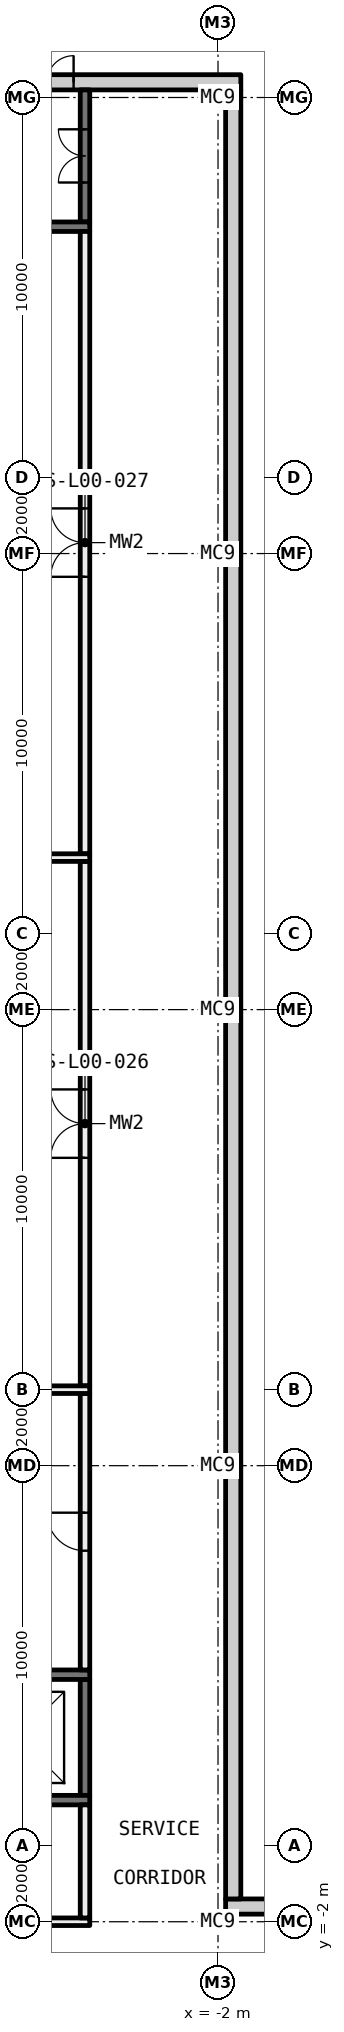
"""IFC4 building model, lengths in metres.
Left out: names, types, materials, properties, quantities, classifications, styles, units other than length and angle.
Written with IfcOpenShell. Run it as: python <this file> out.ifc"""

import sys

from ifc_helpers import new_model, si_unit, direction, frame, frame_2d, origin, origin_2d, place, context, subcontext, project, spatial, rectangle, i_section, extrude, element, fill, save


model = new_model("IFC4")
c1 = context("Model", 3, precision=1e-05, world=origin(), true_north=direction((0.0, 1.0)))
c2 = subcontext(c1, "Body", "Model", "MODEL_VIEW")
j1 = project(units=[si_unit("LENGTHUNIT", "METRE"), si_unit("PLANEANGLEUNIT", "RADIAN")], contexts=[c1])
p1 = place(None, origin())
s1 = spatial("IfcSite", under=j1, at=p1, CompositionType="ELEMENT")
p2 = place(p1, origin())
s2 = spatial("IfcBuilding", under=s1, at=p2, CompositionType="ELEMENT")
p3 = place(p2, origin())
s3 = spatial("IfcBuildingStorey", under=s2, at=p3, CompositionType="ELEMENT", Elevation=0.0)
for number, where, z_axis, x_axis in (
    (1, (-2.0, -2.0, -1.0), (0.0, 0.0, 1.0), (1.0, 0.0, 0.0)),
    (2, (-2.0, 10.0, -1.0), (0.0, 0.0, 1.0), (1.0, 0.0, 0.0)),
    (3, (-2.0, 22.0, -1.0), (0.0, 0.0, 1.0), (1.0, 0.0, 0.0)),
    (4, (-2.0, 34.0, -1.0), (0.0, 0.0, 1.0), (1.0, 0.0, 0.0)),
    (5, (-2.0, 46.0, -1.0), (0.0, 0.0, 1.0), (1.0, 0.0, 0.0)),
):
    element("IfcColumn", number, at=place(p3, frame(where, z_axis=z_axis, x_axis=x_axis)), inside=s3, PredefinedType="COLUMN", context=c2, shape_type="SweptSolid", body=[
        extrude(i_section(OverallWidth=0.4, OverallDepth=0.4, WebThickness=0.013, FlangeThickness=0.021, FilletRadius=0.022, at=origin_2d()), origin(), (0.0, 0.0, 1.0), 6.6),
    ])
p4 = place(p3, frame((-5.5, 12.1, 0.0), z_axis=(0.0, 0.0, 1.0), x_axis=(0.0, 1.0, 0.0)))
e6 = element("IfcWall", 6, at=p4, inside=s3, PredefinedType="PARTITIONING", context=c2, shape_type="SweptSolid", body=[
    extrude(rectangle(XDim=13.8, YDim=0.25, at=frame_2d((6.9, 0.0))), origin(), (0.0, 0.0, 1.0), 5.6),
])
p5 = place(p4, frame((6.0, 0.0, 0.0)))
e7 = element("IfcOpeningElement", 7, at=p5, cuts=e6, PredefinedType="OPENING", context=c2, shape_type="SweptSolid", body=[
    extrude(rectangle(XDim=1.8, YDim=2.1, at=frame_2d((0.9, 1.05))), frame((0.0, 0.135, 0.0), z_axis=(0.0, -1.0, 0.0), x_axis=(1.0, 0.0, 0.0)), (0.0, 0.0, 1.0), 0.27),
])
p6 = place(p3, frame((-5.5, 26.1, 0.0), z_axis=(0.0, 0.0, 1.0), x_axis=(0.0, 1.0, 0.0)))
e8 = element("IfcWall", 8, at=p6, inside=s3, PredefinedType="PARTITIONING", context=c2, shape_type="SweptSolid", body=[
    extrude(rectangle(XDim=16.375, YDim=0.25, at=frame_2d((8.188, 0.0))), origin(), (0.0, 0.0, 1.0), 5.6),
])
p7 = place(p6, frame((7.288, 0.0, 0.0)))
e9 = element("IfcOpeningElement", 9, at=p7, cuts=e8, PredefinedType="OPENING", context=c2, shape_type="SweptSolid", body=[
    extrude(rectangle(XDim=1.8, YDim=2.1, at=frame_2d((0.9, 1.05))), frame((0.0, 0.135, 0.0), z_axis=(0.0, -1.0, 0.0), x_axis=(1.0, 0.0, 0.0)), (0.0, 0.0, 1.0), 0.27),
])
p8 = place(p3, frame((-12.625, -2.0, 0.0), z_axis=(0.0, 0.0, 1.0), x_axis=(1.0, 0.0, 0.0)))
e10 = element("IfcWall", 10, at=p8, inside=s3, PredefinedType="PARTITIONING", context=c2, shape_type="SweptSolid", body=[
    extrude(rectangle(XDim=7.25, YDim=0.2, at=frame_2d((3.625, 0.0))), origin(), (0.0, 0.0, 1.0), 5.012),
])
p9 = place(p8, frame((2.725, 0.0, 0.0)))
e11 = element("IfcOpeningElement", 11, at=p9, cuts=e10, PredefinedType="OPENING", context=c2, shape_type="SweptSolid", body=[
    extrude(rectangle(XDim=1.8, YDim=2.1, at=frame_2d((0.9, 1.05))), frame((0.0, 0.11, 0.0), z_axis=(0.0, -1.0, 0.0), x_axis=(1.0, 0.0, 0.0)), (0.0, 0.0, 1.0), 0.22),
])
p10 = place(p3, frame((-5.5, -1.9, 0.0), z_axis=(0.0, 0.0, 1.0), x_axis=(0.0, 1.0, 0.0)))
e12 = element("IfcWall", 12, at=p10, inside=s3, PredefinedType="PARTITIONING", context=c2, shape_type="SweptSolid", body=[
    extrude(rectangle(XDim=2.975, YDim=0.25, at=frame_2d((1.487, 0.0))), origin(), (0.0, 0.0, 1.0), 5.6),
])
p11 = place(p3, frame((-5.5, 1.325, -1.8), z_axis=(0.0, 0.0, 1.0), x_axis=(0.0, 1.0, 0.0)))
e13 = element("IfcWall", 13, at=p11, inside=s3, PredefinedType="SHEAR", context=c2, shape_type="SweptSolid", body=[
    extrude(rectangle(XDim=3.05, YDim=0.25, at=frame_2d((1.525, 0.0))), origin(), (0.0, 0.0, 1.0), 7.4),
])
p12 = place(p3, frame((-5.5, 42.725, -1.0), z_axis=(0.0, 0.0, 1.0), x_axis=(0.0, 1.0, 0.0)))
e14 = element("IfcWall", 14, at=p12, inside=s3, PredefinedType="SHEAR", context=c2, shape_type="SweptSolid", body=[
    extrude(rectangle(XDim=3.475, YDim=0.25, at=frame_2d((1.737, 0.0))), origin(), (0.0, 0.0, 1.0), 6.6),
])
p13 = place(p12, frame((1.038, 0.0, 1.0)))
e15 = element("IfcOpeningElement", 15, at=p13, cuts=e14, PredefinedType="OPENING", context=c2, shape_type="SweptSolid", body=[
    extrude(rectangle(XDim=1.4, YDim=2.1, at=frame_2d((0.7, 1.05))), frame((0.0, 0.135, 0.0), z_axis=(0.0, -1.0, 0.0), x_axis=(1.0, 0.0, 0.0)), (0.0, 0.0, 1.0), 0.27),
])
p14 = place(p3, frame((-5.5, 4.625, 0.0), z_axis=(0.0, 0.0, 1.0), x_axis=(0.0, 1.0, 0.0)))
e16 = element("IfcWall", 16, at=p14, inside=s3, PredefinedType="PARTITIONING", context=c2, shape_type="SweptSolid", body=[
    extrude(rectangle(XDim=7.275, YDim=0.25, at=frame_2d((3.637, 0.0))), origin(), (0.0, 0.0, 1.0), 5.6),
])
p15 = place(p14, frame((3.138, 0.0, 0.0)))
e17 = element("IfcOpeningElement", 17, at=p15, cuts=e16, PredefinedType="OPENING", context=c2, shape_type="SweptSolid", body=[
    extrude(rectangle(XDim=1.0, YDim=2.1, at=frame_2d((0.5, 1.05))), frame((0.0, 0.135, 0.0), z_axis=(0.0, -1.0, 0.0), x_axis=(1.0, 0.0, 0.0)), (0.0, 0.0, 1.0), 0.27),
])
p16 = place(p3, frame((-26.2, 26.0, 0.0), z_axis=(0.0, 0.0, 1.0), x_axis=(1.0, 0.0, 0.0)))
e18 = element("IfcWall", 18, at=p16, inside=s3, PredefinedType="PARTITIONING", context=c2, shape_type="SweptSolid", body=[
    extrude(rectangle(XDim=20.825, YDim=0.2, at=frame_2d((10.413, 0.0))), origin(), (0.0, 0.0, 1.0), 5.6),
])
p17 = place(p3, frame((-8.875, 1.2, -1.8), z_axis=(0.0, 0.0, 1.0), x_axis=(1.0, 0.0, 0.0)))
e19 = element("IfcWall", 19, at=p17, inside=s3, PredefinedType="SHEAR", context=c2, shape_type="SweptSolid", body=[
    extrude(rectangle(XDim=3.5, YDim=0.25, at=frame_2d((1.75, 0.0))), origin(), (0.0, 0.0, 1.0), 7.4),
])
p18 = place(p17, frame((1.075, 0.0, 1.8)))
e20 = element("IfcOpeningElement", 20, at=p18, cuts=e19, PredefinedType="OPENING", context=c2, shape_type="SweptSolid", body=[
    extrude(rectangle(XDim=1.1, YDim=2.1, at=frame_2d((0.55, 1.05))), frame((0.0, 0.135, 0.0), z_axis=(0.0, -1.0, 0.0), x_axis=(1.0, 0.0, 0.0)), (0.0, 0.0, 1.0), 0.27),
])
p19 = place(p3, frame((-8.0, 4.5, -1.8), z_axis=(0.0, 0.0, 1.0), x_axis=(1.0, 0.0, 0.0)))
e21 = element("IfcWall", 21, at=p19, inside=s3, PredefinedType="SHEAR", context=c2, shape_type="SweptSolid", body=[
    extrude(rectangle(XDim=2.625, YDim=0.25, at=frame_2d((1.312, 0.0))), origin(), (0.0, 0.0, 1.0), 7.4),
])
p20 = place(p3, frame((-14.875, 42.6, -1.0), z_axis=(0.0, 0.0, 1.0), x_axis=(1.0, 0.0, 0.0)))
e22 = element("IfcWall", 22, at=p20, inside=s3, PredefinedType="SHEAR", context=c2, shape_type="SweptSolid", body=[
    extrude(rectangle(XDim=9.5, YDim=0.25, at=frame_2d((4.75, 0.0))), origin(), (0.0, 0.0, 1.0), 6.6),
])
p21 = place(p3, frame((-7.8, 12.0, 0.0), z_axis=(0.0, 0.0, 1.0), x_axis=(1.0, 0.0, 0.0)))
e23 = element("IfcWall", 23, at=p21, inside=s3, PredefinedType="PARTITIONING", context=c2, shape_type="SweptSolid", body=[
    extrude(rectangle(XDim=2.425, YDim=0.2, at=frame_2d((1.212, 0.0))), origin(), (0.0, 0.0, 1.0), 5.6),
])
p22 = place(p3, frame((-1.8, -1.6, -0.4), z_axis=(0.0, 0.0, 1.0), x_axis=(1.0, 0.0, 0.0)))
e24 = element("IfcWall", 24, at=p22, inside=s3, PredefinedType="STANDARD", context=c2, shape_type="SweptSolid", body=[
    extrude(rectangle(XDim=12.4, YDim=0.4, at=frame_2d((6.2, 0.0))), origin(), (0.0, 0.0, 1.0), 6.0),
])
p23 = place(p3, frame((-1.6, -1.4, -0.4), z_axis=(0.0, 0.0, 1.0), x_axis=(0.0, 1.0, 0.0)))
e25 = element("IfcWall", 25, at=p23, inside=s3, PredefinedType="STANDARD", context=c2, shape_type="SweptSolid", body=[
    extrude(rectangle(XDim=47.6, YDim=0.4, at=frame_2d((23.8, 0.0))), origin(), (0.0, 0.0, 1.0), 6.0),
])
p24 = place(p3, frame((-26.6, 46.4, -0.4), z_axis=(0.0, 0.0, 1.0), x_axis=(1.0, 0.0, 0.0)))
e26 = element("IfcWall", 26, at=p24, inside=s3, PredefinedType="STANDARD", context=c2, shape_type="SweptSolid", body=[
    extrude(rectangle(XDim=25.2, YDim=0.4, at=frame_2d((12.6, 0.0))), origin(), (0.0, 0.0, 1.0), 6.0),
])
p25 = place(p24, frame((19.4, 0.0, 0.4)))
e27 = element("IfcOpeningElement", 27, at=p25, cuts=e26, PredefinedType="OPENING", context=c2, shape_type="SweptSolid", body=[
    extrude(rectangle(XDim=1.4, YDim=2.1, at=frame_2d((0.7, 1.05))), frame((0.0, 0.21, 0.0), z_axis=(0.0, -1.0, 0.0), x_axis=(1.0, 0.0, 0.0)), (0.0, 0.0, 1.0), 0.42),
])
p26 = place(p24, frame((5.1, 0.0, 0.4)))
e28 = element("IfcOpeningElement", 28, at=p26, cuts=e26, PredefinedType="OPENING", context=c2, shape_type="SweptSolid", body=[
    extrude(rectangle(XDim=1.0, YDim=2.1, at=frame_2d((0.5, 1.05))), frame((0.0, 0.21, 0.0), z_axis=(0.0, -1.0, 0.0), x_axis=(1.0, 0.0, 0.0)), (0.0, 0.0, 1.0), 0.42),
])
p27 = place(p25, origin())
e29 = element("IfcDoor", 29, at=p27, inside=s3, OperationType="DOUBLE_DOOR_SINGLE_SWING", PredefinedType="DOOR", context=c2, shape_type="SweptSolid", body=[
    extrude(rectangle(XDim=1.4, YDim=2.1, at=frame_2d((0.7, 1.05))), frame((0.0, 0.025, 0.0), z_axis=(0.0, -1.0, 0.0), x_axis=(1.0, 0.0, 0.0)), (0.0, 0.0, 1.0), 0.05),
])
fill(e27, e29)
p28 = place(p13, origin())
e30 = element("IfcDoor", 30, at=p28, inside=s3, OperationType="DOUBLE_DOOR_SINGLE_SWING", PredefinedType="DOOR", context=c2, shape_type="SweptSolid", body=[
    extrude(rectangle(XDim=1.4, YDim=2.1, at=frame_2d((0.7, 1.05))), frame((0.0, 0.025, 0.0), z_axis=(0.0, -1.0, 0.0), x_axis=(1.0, 0.0, 0.0)), (0.0, 0.0, 1.0), 0.05),
])
fill(e15, e30)
p29 = place(p15, origin())
e31 = element("IfcDoor", 31, at=p29, inside=s3, OperationType="SINGLE_SWING_LEFT", PredefinedType="DOOR", context=c2, shape_type="SweptSolid", body=[
    extrude(rectangle(XDim=1.0, YDim=2.1, at=frame_2d((0.5, 1.05))), frame((0.0, 0.025, 0.0), z_axis=(0.0, -1.0, 0.0), x_axis=(1.0, 0.0, 0.0)), (0.0, 0.0, 1.0), 0.05),
])
fill(e17, e31)
p30 = place(p5, origin())
e32 = element("IfcDoor", 32, at=p30, inside=s3, OperationType="DOUBLE_DOOR_SINGLE_SWING", PredefinedType="DOOR", context=c2, shape_type="SweptSolid", body=[
    extrude(rectangle(XDim=1.8, YDim=2.1, at=frame_2d((0.9, 1.05))), frame((0.0, 0.025, 0.0), z_axis=(0.0, -1.0, 0.0), x_axis=(1.0, 0.0, 0.0)), (0.0, 0.0, 1.0), 0.05),
])
fill(e7, e32)
p31 = place(p7, origin())
e33 = element("IfcDoor", 33, at=p31, inside=s3, OperationType="DOUBLE_DOOR_SINGLE_SWING", PredefinedType="DOOR", context=c2, shape_type="SweptSolid", body=[
    extrude(rectangle(XDim=1.8, YDim=2.1, at=frame_2d((0.9, 1.05))), frame((0.0, 0.025, 0.0), z_axis=(0.0, -1.0, 0.0), x_axis=(1.0, 0.0, 0.0)), (0.0, 0.0, 1.0), 0.05),
])
fill(e9, e33)
save(model, sys.argv[1])
